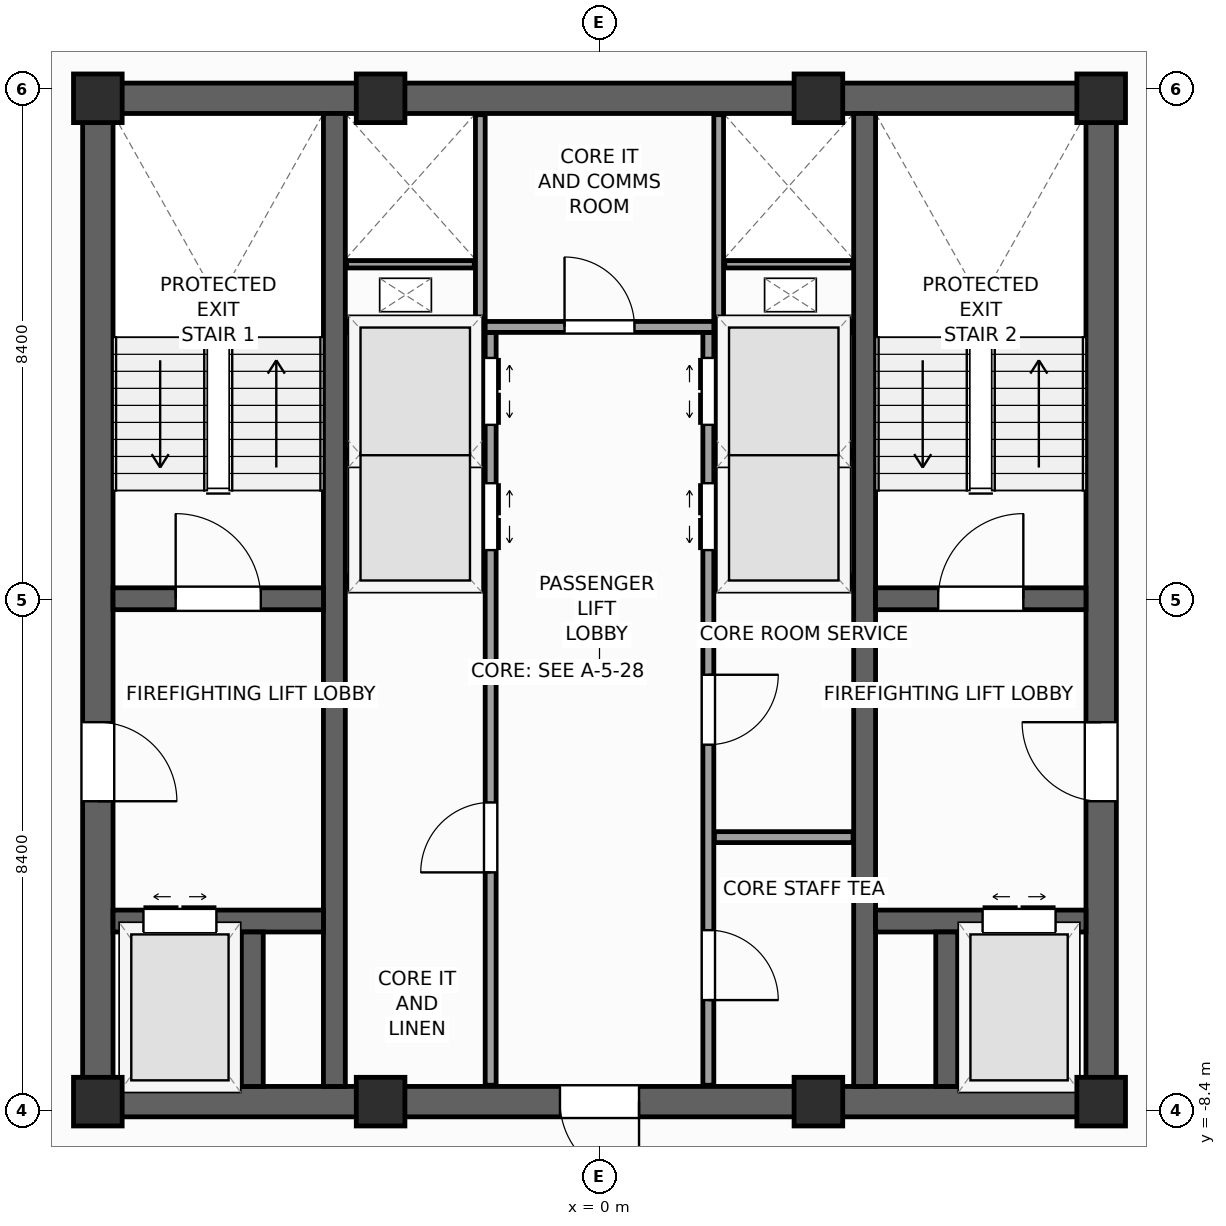
"""IFC4 building model, lengths in metres.
Left out: names, types, materials, properties, quantities, classifications, styles, units other than length and angle.
Written with IfcOpenShell. Run it as: python <this file> out.ifc"""

import sys

from ifc_helpers import new_model, si_unit, direction, frame, frame_2d, origin, origin_2d, place, context, subcontext, project, spatial, rectangle, extrude, source, transform, mapped, element, fill, save


model = new_model("IFC4")
c1 = context("Model", 3, precision=1e-05, world=origin(), true_north=direction((0.0, 1.0)))
c2 = subcontext(c1, "Body", "Model", "MODEL_VIEW")
j1 = project(units=[si_unit("LENGTHUNIT", "METRE"), si_unit("PLANEANGLEUNIT", "RADIAN")], contexts=[c1])
p1 = place(None, origin())
s1 = spatial("IfcSite", under=j1, at=p1, CompositionType="ELEMENT")
p2 = place(p1, origin())
s2 = spatial("IfcBuilding", under=s1, at=p2, CompositionType="ELEMENT")
p3 = place(p2, frame((0.0, 0.0, 290.4)))
s3 = spatial("IfcBuildingStorey", under=s2, at=p3, CompositionType="ELEMENT", Elevation=290.4)
p4 = place(p3, frame((-8.5, -8.25, 0.0), z_axis=(0.0, 0.0, 1.0), x_axis=(1.0, 0.0, 0.0)))
e1 = element("IfcWall", 1, at=p4, inside=s3, PredefinedType="SHEAR", context=c2, shape_type="SweptSolid", body=[
    extrude(rectangle(XDim=17.0, YDim=0.5, at=frame_2d((8.5, 0.0))), origin(), (0.0, 0.0, 1.0), 3.6),
])
p5 = place(p4, frame((7.85, 0.0, 0.0)))
e2 = element("IfcOpeningElement", 2, at=p5, cuts=e1, PredefinedType="OPENING", context=c2, shape_type="SweptSolid", body=[
    extrude(rectangle(XDim=1.3, YDim=2.2, at=frame_2d((0.65, 1.1))), frame((0.0, 0.26, 0.0), z_axis=(0.0, -1.0, 0.0), x_axis=(1.0, 0.0, 0.0)), (0.0, 0.0, 1.0), 0.52),
])
p6 = place(p3, frame((-8.5, 8.25, 0.0), z_axis=(0.0, 0.0, 1.0), x_axis=(1.0, 0.0, 0.0)))
e3 = element("IfcWall", 3, at=p6, inside=s3, PredefinedType="SHEAR", context=c2, shape_type="SweptSolid", body=[
    extrude(rectangle(XDim=17.0, YDim=0.5, at=frame_2d((8.5, 0.0))), origin(), (0.0, 0.0, 1.0), 3.6),
])
p7 = place(p3, frame((-8.25, -8.0, 0.0), z_axis=(0.0, 0.0, 1.0), x_axis=(0.0, 1.0, 0.0)))
e4 = element("IfcWall", 4, at=p7, inside=s3, PredefinedType="SHEAR", context=c2, shape_type="SweptSolid", body=[
    extrude(rectangle(XDim=16.0, YDim=0.5, at=frame_2d((8.0, 0.0))), origin(), (0.0, 0.0, 1.0), 3.6),
])
p8 = place(p7, frame((4.69, 0.0, 0.0)))
e5 = element("IfcOpeningElement", 5, at=p8, cuts=e4, PredefinedType="OPENING", context=c2, shape_type="SweptSolid", body=[
    extrude(rectangle(XDim=1.3, YDim=2.2, at=frame_2d((0.65, 1.1))), frame((0.0, 0.26, 0.0), z_axis=(0.0, -1.0, 0.0), x_axis=(1.0, 0.0, 0.0)), (0.0, 0.0, 1.0), 0.52),
])
p9 = place(p3, frame((8.25, -8.0, 0.0), z_axis=(0.0, 0.0, 1.0), x_axis=(0.0, 1.0, 0.0)))
e6 = element("IfcWall", 6, at=p9, inside=s3, PredefinedType="SHEAR", context=c2, shape_type="SweptSolid", body=[
    extrude(rectangle(XDim=16.0, YDim=0.5, at=frame_2d((8.0, 0.0))), origin(), (0.0, 0.0, 1.0), 3.6),
])
p10 = place(p9, frame((4.69, 0.0, 0.0)))
e7 = element("IfcOpeningElement", 7, at=p10, cuts=e6, PredefinedType="OPENING", context=c2, shape_type="SweptSolid", body=[
    extrude(rectangle(XDim=1.3, YDim=2.2, at=frame_2d((0.65, 1.1))), frame((0.0, 0.26, 0.0), z_axis=(0.0, -1.0, 0.0), x_axis=(1.0, 0.0, 0.0)), (0.0, 0.0, 1.0), 0.52),
])
for number, where, z_axis, x_axis in (
    (8, (-4.36, -8.0, 0.0), (0.0, 0.0, 1.0), (0.0, 1.0, 0.0)),
    (9, (4.36, -8.0, 0.0), (0.0, 0.0, 1.0), (0.0, 1.0, 0.0)),
):
    element("IfcWall", number, at=place(p3, frame(where, z_axis=z_axis, x_axis=x_axis)), inside=s3, PredefinedType="SHEAR", context=c2, shape_type="SweptSolid", body=[
        extrude(rectangle(XDim=16.0, YDim=0.36, at=frame_2d((8.0, 0.0))), origin(), (0.0, 0.0, 1.0), 3.6),
    ])
p11 = place(p3, frame((-8.0, 0.02, 0.0), z_axis=(0.0, 0.0, 1.0), x_axis=(1.0, 0.0, 0.0)))
e10 = element("IfcWall", 10, at=p11, inside=s3, PredefinedType="SHEAR", context=c2, shape_type="SweptSolid", body=[
    extrude(rectangle(XDim=3.46, YDim=0.36, at=frame_2d((1.73, 0.0))), origin(), (0.0, 0.0, 1.0), 3.6),
])
p12 = place(p11, frame((1.03, 0.0, 0.0)))
e11 = element("IfcOpeningElement", 11, at=p12, cuts=e10, PredefinedType="OPENING", context=c2, shape_type="SweptSolid", body=[
    extrude(rectangle(XDim=1.4, YDim=2.2, at=frame_2d((0.7, 1.1))), frame((0.0, 0.19, 0.0), z_axis=(0.0, -1.0, 0.0), x_axis=(1.0, 0.0, 0.0)), (0.0, 0.0, 1.0), 0.38),
])
p13 = place(p3, frame((4.54, 0.02, 0.0), z_axis=(0.0, 0.0, 1.0), x_axis=(1.0, 0.0, 0.0)))
e12 = element("IfcWall", 12, at=p13, inside=s3, PredefinedType="SHEAR", context=c2, shape_type="SweptSolid", body=[
    extrude(rectangle(XDim=3.46, YDim=0.36, at=frame_2d((1.73, 0.0))), origin(), (0.0, 0.0, 1.0), 3.6),
])
p14 = place(p13, frame((1.03, 0.0, 0.0)))
e13 = element("IfcOpeningElement", 13, at=p14, cuts=e12, PredefinedType="OPENING", context=c2, shape_type="SweptSolid", body=[
    extrude(rectangle(XDim=1.4, YDim=2.2, at=frame_2d((0.7, 1.1))), frame((0.0, 0.19, 0.0), z_axis=(0.0, -1.0, 0.0), x_axis=(1.0, 0.0, 0.0)), (0.0, 0.0, 1.0), 0.38),
])
p15 = place(p3, frame((-8.0, -5.28, 0.0), z_axis=(0.0, 0.0, 1.0), x_axis=(1.0, 0.0, 0.0)))
e14 = element("IfcWall", 14, at=p15, inside=s3, PredefinedType="SHEAR", context=c2, shape_type="SweptSolid", body=[
    extrude(rectangle(XDim=3.46, YDim=0.36, at=frame_2d((1.73, 0.0))), origin(), (0.0, 0.0, 1.0), 3.6),
])
p16 = place(p15, frame((0.5, 0.0, 0.0)))
e15 = element("IfcOpeningElement", 15, at=p16, cuts=e14, PredefinedType="OPENING", context=c2, shape_type="SweptSolid", body=[
    extrude(rectangle(XDim=1.2, YDim=2.25, at=frame_2d((0.6, 1.125))), frame((0.0, 0.19, 0.0), z_axis=(0.0, -1.0, 0.0), x_axis=(1.0, 0.0, 0.0)), (0.0, 0.0, 1.0), 0.38),
])
p17 = place(p3, frame((4.54, -5.28, 0.0), z_axis=(0.0, 0.0, 1.0), x_axis=(1.0, 0.0, 0.0)))
e16 = element("IfcWall", 16, at=p17, inside=s3, PredefinedType="SHEAR", context=c2, shape_type="SweptSolid", body=[
    extrude(rectangle(XDim=3.46, YDim=0.36, at=frame_2d((1.73, 0.0))), origin(), (0.0, 0.0, 1.0), 3.6),
])
p18 = place(p17, frame((1.76, 0.0, 0.0)))
e17 = element("IfcOpeningElement", 17, at=p18, cuts=e16, PredefinedType="OPENING", context=c2, shape_type="SweptSolid", body=[
    extrude(rectangle(XDim=1.2, YDim=2.25, at=frame_2d((0.6, 1.125))), frame((0.0, 0.19, 0.0), z_axis=(0.0, -1.0, 0.0), x_axis=(1.0, 0.0, 0.0)), (0.0, 0.0, 1.0), 0.38),
])
for number, where, z_axis, x_axis in (
    (18, (-5.71, -8.0, 0.0), (0.0, 0.0, 1.0), (0.0, 1.0, 0.0)),
    (19, (5.71, -8.0, 0.0), (0.0, 0.0, 1.0), (0.0, 1.0, 0.0)),
):
    element("IfcWall", number, at=place(p3, frame(where, z_axis=z_axis, x_axis=x_axis)), inside=s3, PredefinedType="SHEAR", context=c2, shape_type="SweptSolid", body=[
        extrude(rectangle(XDim=2.54, YDim=0.36, at=frame_2d((1.27, 0.0))), origin(), (0.0, 0.0, 1.0), 3.6),
    ])
m1 = source(origin(), c2, "Body", "SweptSolid", [
    extrude(rectangle(XDim=0.8, YDim=0.8, at=origin_2d()), origin(), (0.0, 0.0, 1.0), 3.6),
])
for number, where, z_axis, x_axis in (
    (20, (-8.25, -8.25, 0.0), (0.0, 0.0, 1.0), (1.0, 0.0, 0.0)),
    (21, (8.25, -8.25, 0.0), (0.0, 0.0, 1.0), (1.0, 0.0, 0.0)),
    (22, (8.25, 8.25, 0.0), (0.0, 0.0, 1.0), (1.0, 0.0, 0.0)),
    (23, (-8.25, 8.25, 0.0), (0.0, 0.0, 1.0), (1.0, 0.0, 0.0)),
    (24, (-3.6, -8.25, 0.0), (0.0, 0.0, 1.0), (1.0, 0.0, 0.0)),
    (25, (3.6, -8.25, 0.0), (0.0, 0.0, 1.0), (1.0, 0.0, 0.0)),
    (26, (-3.6, 8.25, 0.0), (0.0, 0.0, 1.0), (1.0, 0.0, 0.0)),
    (27, (3.6, 8.25, 0.0), (0.0, 0.0, 1.0), (1.0, 0.0, 0.0)),
):
    element("IfcColumn", number, at=place(p3, frame(where, z_axis=z_axis, x_axis=x_axis)), inside=s3, PredefinedType="PILASTER", context=c2, shape_type="MappedRepresentation", body=[
        mapped(m1, transform((0.0, 0.0, 0.0), scale=1.0)),
    ])
p19 = place(p3, frame((-1.79, -7.98, 0.0), z_axis=(0.0, 0.0, 1.0), x_axis=(0.0, 1.0, 0.0)))
e28 = element("IfcWall", 28, at=p19, inside=s3, PredefinedType="PARTITIONING", context=c2, shape_type="SweptSolid", body=[
    extrude(rectangle(XDim=12.38, YDim=0.18, at=frame_2d((6.19, 0.0))), origin(), (0.0, 0.0, 1.0), 3.35),
])
p20 = place(p19, frame((8.8, 0.0, 0.0)))
e29 = element("IfcOpeningElement", 29, at=p20, cuts=e28, PredefinedType="OPENING", context=c2, shape_type="SweptSolid", body=[
    extrude(rectangle(XDim=1.1, YDim=2.2, at=frame_2d((0.55, 1.1))), frame((0.0, 0.1, 0.0), z_axis=(0.0, -1.0, 0.0), x_axis=(1.0, 0.0, 0.0)), (0.0, 0.0, 1.0), 0.2),
])
p21 = place(p19, frame((10.86, 0.0, 0.0)))
e30 = element("IfcOpeningElement", 30, at=p21, cuts=e28, PredefinedType="OPENING", context=c2, shape_type="SweptSolid", body=[
    extrude(rectangle(XDim=1.1, YDim=2.2, at=frame_2d((0.55, 1.1))), frame((0.0, 0.1, 0.0), z_axis=(0.0, -1.0, 0.0), x_axis=(1.0, 0.0, 0.0)), (0.0, 0.0, 1.0), 0.2),
])
p22 = place(p19, frame((3.5, 0.0, 0.0)))
e31 = element("IfcOpeningElement", 31, at=p22, cuts=e28, PredefinedType="OPENING", context=c2, shape_type="SweptSolid", body=[
    extrude(rectangle(XDim=1.15, YDim=2.25, at=frame_2d((0.575, 1.125))), frame((0.0, 0.1, 0.0), z_axis=(0.0, -1.0, 0.0), x_axis=(1.0, 0.0, 0.0)), (0.0, 0.0, 1.0), 0.2),
])
p23 = place(p3, frame((1.79, -7.98, 0.0), z_axis=(0.0, 0.0, 1.0), x_axis=(0.0, 1.0, 0.0)))
e32 = element("IfcWall", 32, at=p23, inside=s3, PredefinedType="PARTITIONING", context=c2, shape_type="SweptSolid", body=[
    extrude(rectangle(XDim=12.38, YDim=0.18, at=frame_2d((6.19, 0.0))), origin(), (0.0, 0.0, 1.0), 3.35),
])
p24 = place(p23, frame((8.8, 0.0, 0.0)))
e33 = element("IfcOpeningElement", 33, at=p24, cuts=e32, PredefinedType="OPENING", context=c2, shape_type="SweptSolid", body=[
    extrude(rectangle(XDim=1.1, YDim=2.2, at=frame_2d((0.55, 1.1))), frame((0.0, 0.1, 0.0), z_axis=(0.0, -1.0, 0.0), x_axis=(1.0, 0.0, 0.0)), (0.0, 0.0, 1.0), 0.2),
])
p25 = place(p23, frame((10.86, 0.0, 0.0)))
e34 = element("IfcOpeningElement", 34, at=p25, cuts=e32, PredefinedType="OPENING", context=c2, shape_type="SweptSolid", body=[
    extrude(rectangle(XDim=1.1, YDim=2.2, at=frame_2d((0.55, 1.1))), frame((0.0, 0.1, 0.0), z_axis=(0.0, -1.0, 0.0), x_axis=(1.0, 0.0, 0.0)), (0.0, 0.0, 1.0), 0.2),
])
p26 = place(p23, frame((1.4, 0.0, 0.0)))
e35 = element("IfcOpeningElement", 35, at=p26, cuts=e32, PredefinedType="OPENING", context=c2, shape_type="SweptSolid", body=[
    extrude(rectangle(XDim=1.15, YDim=2.25, at=frame_2d((0.575, 1.125))), frame((0.0, 0.1, 0.0), z_axis=(0.0, -1.0, 0.0), x_axis=(1.0, 0.0, 0.0)), (0.0, 0.0, 1.0), 0.2),
])
p27 = place(p23, frame((5.6, 0.0, 0.0)))
e36 = element("IfcOpeningElement", 36, at=p27, cuts=e32, PredefinedType="OPENING", context=c2, shape_type="SweptSolid", body=[
    extrude(rectangle(XDim=1.15, YDim=2.25, at=frame_2d((0.575, 1.125))), frame((0.0, 0.1, 0.0), z_axis=(0.0, -1.0, 0.0), x_axis=(1.0, 0.0, 0.0)), (0.0, 0.0, 1.0), 0.2),
])
p28 = place(p3, frame((-1.88, 4.49, 0.0), z_axis=(0.0, 0.0, 1.0), x_axis=(1.0, 0.0, 0.0)))
e37 = element("IfcWall", 37, at=p28, inside=s3, PredefinedType="PARTITIONING", context=c2, shape_type="SweptSolid", body=[
    extrude(rectangle(XDim=3.76, YDim=0.18, at=frame_2d((1.88, 0.0))), origin(), (0.0, 0.0, 1.0), 3.35),
])
p29 = place(p28, frame((1.305, 0.0, 0.0)))
e38 = element("IfcOpeningElement", 38, at=p29, cuts=e37, PredefinedType="OPENING", context=c2, shape_type="SweptSolid", body=[
    extrude(rectangle(XDim=1.15, YDim=2.25, at=frame_2d((0.575, 1.125))), frame((0.0, 0.1, 0.0), z_axis=(0.0, -1.0, 0.0), x_axis=(1.0, 0.0, 0.0)), (0.0, 0.0, 1.0), 0.2),
])
for number, where, z_axis, x_axis in (
    (39, (1.89, -3.9, 0.0), (0.0, 0.0, 1.0), (1.0, 0.0, 0.0)),
    (40, (-4.17, 0.3, 0.0), (0.0, 0.0, 1.0), (1.0, 0.0, 0.0)),
    (41, (1.89, 0.3, 0.0), (0.0, 0.0, 1.0), (1.0, 0.0, 0.0)),
    (42, (-4.17, 4.49, 0.0), (0.0, 0.0, 1.0), (1.0, 0.0, 0.0)),
    (43, (1.89, 4.49, 0.0), (0.0, 0.0, 1.0), (1.0, 0.0, 0.0)),
):
    element("IfcWall", number, at=place(p3, frame(where, z_axis=z_axis, x_axis=x_axis)), inside=s3, PredefinedType="PARTITIONING", context=c2, shape_type="SweptSolid", body=[
        extrude(rectangle(XDim=2.28, YDim=0.18, at=frame_2d((1.14, 0.0))), origin(), (0.0, 0.0, 1.0), 3.35),
    ])
for number, where, z_axis, x_axis in (
    (44, (-4.16, 2.4, 0.0), (0.0, 0.0, 1.0), (1.0, 0.0, 0.0)),
    (45, (1.9, 2.4, 0.0), (0.0, 0.0, 1.0), (1.0, 0.0, 0.0)),
):
    element("IfcWall", number, at=place(p3, frame(where, z_axis=z_axis, x_axis=x_axis)), inside=s3, PredefinedType="PARTITIONING", context=c2, shape_type="SweptSolid", body=[
        extrude(rectangle(XDim=2.26, YDim=0.12, at=frame_2d((1.13, 0.0))), origin(), (0.0, 0.0, 1.0), 3.35),
    ])
for number, where, z_axis, x_axis in (
    (46, (-1.96, 4.58, 0.0), (0.0, 0.0, 1.0), (0.0, 1.0, 0.0)),
    (47, (1.96, 4.58, 0.0), (0.0, 0.0, 1.0), (0.0, 1.0, 0.0)),
):
    element("IfcWall", number, at=place(p3, frame(where, z_axis=z_axis, x_axis=x_axis)), inside=s3, PredefinedType="PARTITIONING", context=c2, shape_type="SweptSolid", body=[
        extrude(rectangle(XDim=3.4, YDim=0.16, at=frame_2d((1.7, 0.0))), origin(), (0.0, 0.0, 1.0), 3.35),
    ])
for number, where, z_axis, x_axis in (
    (48, (-4.16, 5.52, 0.0), (0.0, 0.0, 1.0), (1.0, 0.0, 0.0)),
    (49, (2.06, 5.52, 0.0), (0.0, 0.0, 1.0), (1.0, 0.0, 0.0)),
):
    element("IfcWall", number, at=place(p3, frame(where, z_axis=z_axis, x_axis=x_axis)), inside=s3, PredefinedType="PARTITIONING", context=c2, shape_type="SweptSolid", body=[
        extrude(rectangle(XDim=2.1, YDim=0.12, at=frame_2d((1.05, 0.0))), origin(), (0.0, 0.0, 1.0), 3.35),
    ])
m2 = source(origin(), c2, "Body", "SweptSolid", [
    extrude(rectangle(XDim=1.4, YDim=2.2, at=frame_2d((0.7, 1.1))), frame((0.0, 0.025, 0.0), z_axis=(0.0, -1.0, 0.0), x_axis=(1.0, 0.0, 0.0)), (0.0, 0.0, 1.0), 0.05),
])
p30 = place(p12, origin())
e50 = element("IfcDoor", 50, at=p30, inside=s3, OperationType="SINGLE_SWING_LEFT", PredefinedType="DOOR", context=c2, shape_type="MappedRepresentation", body=[
    mapped(m2, transform((0.0, 0.0, 0.0), scale=1.0)),
])
fill(e11, e50)
p31 = place(p14, origin())
e51 = element("IfcDoor", 51, at=p31, inside=s3, OperationType="SINGLE_SWING_RIGHT", PredefinedType="DOOR", context=c2, shape_type="MappedRepresentation", body=[
    mapped(m2, transform((0.0, 0.0, 0.0), scale=1.0)),
])
fill(e13, e51)
m3 = source(origin(), c2, "Body", "SweptSolid", [
    extrude(rectangle(XDim=1.3, YDim=2.2, at=frame_2d((0.65, 1.1))), frame((0.0, 0.025, 0.0), z_axis=(0.0, -1.0, 0.0), x_axis=(1.0, 0.0, 0.0)), (0.0, 0.0, 1.0), 0.05),
])
p32 = place(p8, frame((1.3, 0.0, 0.0), z_axis=(0.0, 0.0, 1.0), x_axis=(-1.0, 0.0, 0.0)))
e52 = element("IfcDoor", 52, at=p32, inside=s3, OperationType="SINGLE_SWING_LEFT", PredefinedType="DOOR", context=c2, shape_type="MappedRepresentation", body=[
    mapped(m3, transform((0.0, 0.0, 0.0), scale=1.0)),
])
fill(e5, e52)
p33 = place(p10, origin())
e53 = element("IfcDoor", 53, at=p33, inside=s3, OperationType="SINGLE_SWING_RIGHT", PredefinedType="DOOR", context=c2, shape_type="MappedRepresentation", body=[
    mapped(m3, transform((0.0, 0.0, 0.0), scale=1.0)),
])
fill(e7, e53)
p34 = place(p5, frame((1.3, 0.0, 0.0), z_axis=(0.0, 0.0, 1.0), x_axis=(-1.0, 0.0, 0.0)))
e54 = element("IfcDoor", 54, at=p34, inside=s3, OperationType="SINGLE_SWING_RIGHT", PredefinedType="DOOR", context=c2, shape_type="MappedRepresentation", body=[
    mapped(m3, transform((0.0, 0.0, 0.0), scale=1.0)),
])
fill(e2, e54)
m4 = source(origin(), c2, "Body", "SweptSolid", [
    extrude(rectangle(XDim=1.2, YDim=2.25, at=frame_2d((0.6, 1.125))), frame((0.0, 0.025, 0.0), z_axis=(0.0, -1.0, 0.0), x_axis=(1.0, 0.0, 0.0)), (0.0, 0.0, 1.0), 0.05),
])
p35 = place(p16, origin())
e55 = element("IfcDoor", 55, at=p35, inside=s3, OperationType="DOUBLE_DOOR_SLIDING", PredefinedType="DOOR", context=c2, shape_type="MappedRepresentation", body=[
    mapped(m4, transform((0.0, 0.0, 0.0), scale=1.0)),
])
fill(e15, e55)
p36 = place(p18, origin())
e56 = element("IfcDoor", 56, at=p36, inside=s3, OperationType="DOUBLE_DOOR_SLIDING", PredefinedType="DOOR", context=c2, shape_type="MappedRepresentation", body=[
    mapped(m4, transform((0.0, 0.0, 0.0), scale=1.0)),
])
fill(e17, e56)
m5 = source(origin(), c2, "Body", "SweptSolid", [
    extrude(rectangle(XDim=1.1, YDim=2.2, at=frame_2d((0.55, 1.1))), frame((0.0, 0.025, 0.0), z_axis=(0.0, -1.0, 0.0), x_axis=(1.0, 0.0, 0.0)), (0.0, 0.0, 1.0), 0.05),
])
p37 = place(p20, frame((1.1, 0.0, 0.0), z_axis=(0.0, 0.0, 1.0), x_axis=(-1.0, 0.0, 0.0)))
e57 = element("IfcDoor", 57, at=p37, inside=s3, OperationType="DOUBLE_DOOR_SLIDING", PredefinedType="DOOR", context=c2, shape_type="MappedRepresentation", body=[
    mapped(m5, transform((0.0, 0.0, 0.0), scale=1.0)),
])
fill(e29, e57)
p38 = place(p21, frame((1.1, 0.0, 0.0), z_axis=(0.0, 0.0, 1.0), x_axis=(-1.0, 0.0, 0.0)))
e58 = element("IfcDoor", 58, at=p38, inside=s3, OperationType="DOUBLE_DOOR_SLIDING", PredefinedType="DOOR", context=c2, shape_type="MappedRepresentation", body=[
    mapped(m5, transform((0.0, 0.0, 0.0), scale=1.0)),
])
fill(e30, e58)
p39 = place(p24, origin())
e59 = element("IfcDoor", 59, at=p39, inside=s3, OperationType="DOUBLE_DOOR_SLIDING", PredefinedType="DOOR", context=c2, shape_type="MappedRepresentation", body=[
    mapped(m5, transform((0.0, 0.0, 0.0), scale=1.0)),
])
fill(e33, e59)
p40 = place(p25, origin())
e60 = element("IfcDoor", 60, at=p40, inside=s3, OperationType="DOUBLE_DOOR_SLIDING", PredefinedType="DOOR", context=c2, shape_type="MappedRepresentation", body=[
    mapped(m5, transform((0.0, 0.0, 0.0), scale=1.0)),
])
fill(e34, e60)
m6 = source(origin(), c2, "Body", "SweptSolid", [
    extrude(rectangle(XDim=1.15, YDim=2.25, at=frame_2d((0.575, 1.125))), frame((0.0, 0.025, 0.0), z_axis=(0.0, -1.0, 0.0), x_axis=(1.0, 0.0, 0.0)), (0.0, 0.0, 1.0), 0.05),
])
p41 = place(p22, origin())
e61 = element("IfcDoor", 61, at=p41, inside=s3, OperationType="SINGLE_SWING_LEFT", PredefinedType="DOOR", context=c2, shape_type="MappedRepresentation", body=[
    mapped(m6, transform((0.0, 0.0, 0.0), scale=1.0)),
])
fill(e31, e61)
p42 = place(p26, frame((1.15, 0.0, 0.0), z_axis=(0.0, 0.0, 1.0), x_axis=(-1.0, 0.0, 0.0)))
e62 = element("IfcDoor", 62, at=p42, inside=s3, OperationType="SINGLE_SWING_LEFT", PredefinedType="DOOR", context=c2, shape_type="MappedRepresentation", body=[
    mapped(m6, transform((0.0, 0.0, 0.0), scale=1.0)),
])
fill(e35, e62)
p43 = place(p27, frame((1.15, 0.0, 0.0), z_axis=(0.0, 0.0, 1.0), x_axis=(-1.0, 0.0, 0.0)))
e63 = element("IfcDoor", 63, at=p43, inside=s3, OperationType="SINGLE_SWING_RIGHT", PredefinedType="DOOR", context=c2, shape_type="MappedRepresentation", body=[
    mapped(m6, transform((0.0, 0.0, 0.0), scale=1.0)),
])
fill(e36, e63)
p44 = place(p29, origin())
e64 = element("IfcDoor", 64, at=p44, inside=s3, OperationType="SINGLE_SWING_LEFT", PredefinedType="DOOR", context=c2, shape_type="MappedRepresentation", body=[
    mapped(m6, transform((0.0, 0.0, 0.0), scale=1.0)),
])
fill(e38, e64)
save(model, sys.argv[1])
